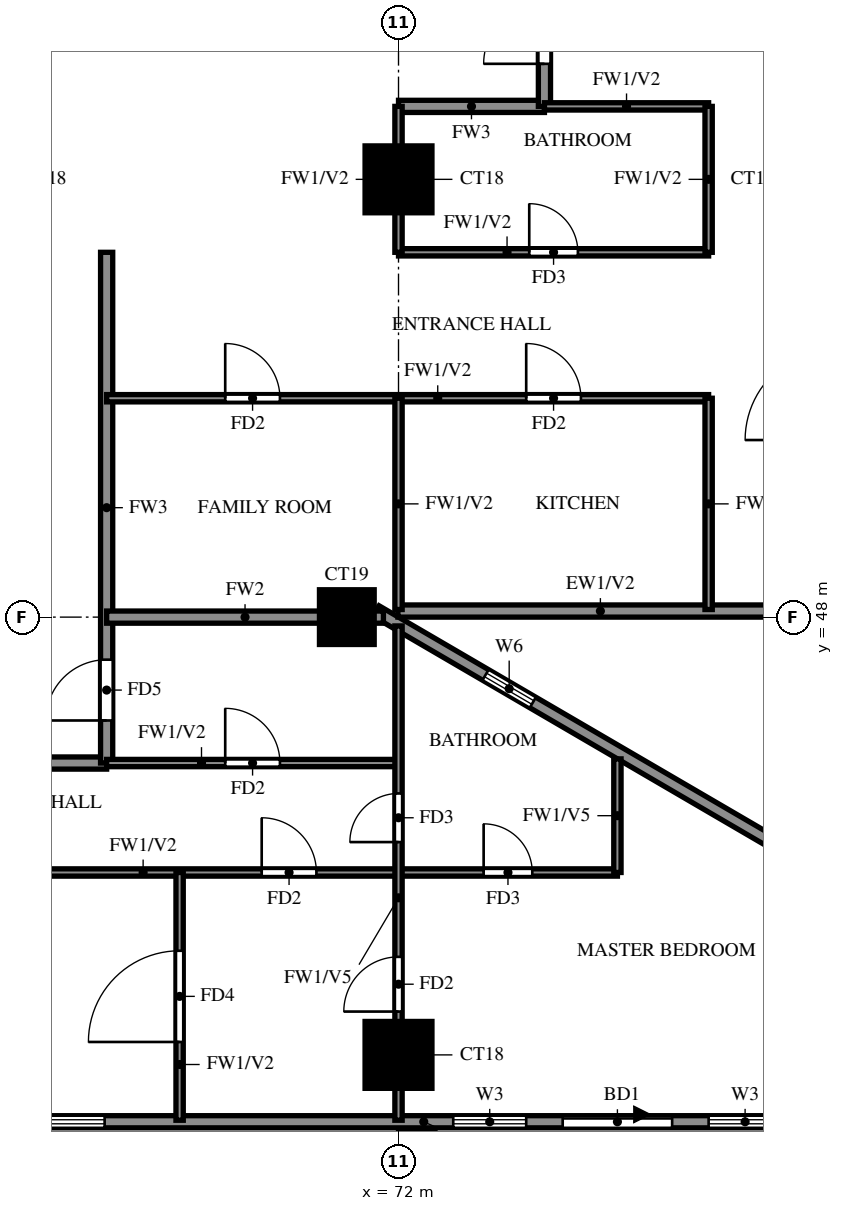
"""IFC4 building model, lengths in metres.
Left out: names, types, materials, properties, quantities, classifications, styles, units other than length and angle.
Written with IfcOpenShell. Run it as: python <this file> out.ifc"""

import sys

from ifc_helpers import new_model, si_unit, direction, frame, frame_2d, origin, origin_2d, place, context, subcontext, project, spatial, rectangle, extrude, source, transform, mapped, element, fill, save


model = new_model("IFC4")
c1 = context("Model", 3, precision=1e-05, world=origin(), true_north=direction((0.0, 1.0)))
c2 = subcontext(c1, "Body", "Model", "MODEL_VIEW")
j1 = project(units=[si_unit("LENGTHUNIT", "METRE"), si_unit("PLANEANGLEUNIT", "RADIAN")], contexts=[c1])
p1 = place(None, origin())
s1 = spatial("IfcSite", under=j1, at=p1, CompositionType="ELEMENT")
p2 = place(p1, origin())
s2 = spatial("IfcBuilding", under=s1, at=p2, CompositionType="ELEMENT")
p3 = place(p2, frame((0.0, 0.0, 127.0)))
s3 = spatial("IfcBuildingStorey", under=s2, at=p3, CompositionType="ELEMENT", Elevation=127.0)
m1 = source(origin(), c2, "Body", "SweptSolid", [
    extrude(rectangle(XDim=1.1, YDim=1.1, at=origin_2d()), origin(), (0.0, 0.0, 1.0), 3.2),
])
p4 = place(p3, frame((72.0, 40.8, 0.0), z_axis=(0.0, 0.0, 1.0), x_axis=(1.0, 0.0, 0.0)))
e1 = element("IfcColumn", 1, at=p4, inside=s3, PredefinedType="COLUMN", context=c2, shape_type="MappedRepresentation", body=[
    mapped(m1, transform((0.0, 0.0, 0.0))),
])
m2 = source(origin(), c2, "Body", "SweptSolid", [
    extrude(rectangle(XDim=0.9, YDim=0.9, at=origin_2d()), origin(), (0.0, 0.0, 1.0), 3.2),
])
p5 = place(p3, frame((71.15, 48.0, 0.0), z_axis=(0.0, 0.0, 1.0), x_axis=(1.0, 0.0, 0.0)))
e2 = element("IfcColumn", 2, at=p5, inside=s3, PredefinedType="COLUMN", context=c2, shape_type="MappedRepresentation", body=[
    mapped(m2, transform((0.0, 0.0, 0.0))),
])
p6 = place(p3, frame((72.0, 55.2, 0.0), z_axis=(0.0, 0.0, 1.0), x_axis=(1.0, 0.0, 0.0)))
e3 = element("IfcColumn", 3, at=p6, inside=s3, PredefinedType="COLUMN", context=c2, shape_type="MappedRepresentation", body=[
    mapped(m1, transform((0.0, 0.0, 0.0))),
])
p7 = place(p3, frame((85.719, 39.881, 0.0), z_axis=(0.0, 0.0, 1.0), x_axis=(-0.86377618652, 0.503875678716, 0.0)))
e4 = element("IfcWall", 4, at=p7, inside=s3, PredefinedType="SOLIDWALL", context=c2, shape_type="SweptSolid", body=[
    extrude(rectangle(XDim=16.311, YDim=0.2, at=frame_2d((8.156, 0.0))), origin(), (0.0, 0.0, 1.0), 3.2),
])
p8 = place(p7, frame((13.326, 0.0, 1.5)))
e5 = element("IfcOpeningElement", 5, at=p8, cuts=e4, PredefinedType="OPENING", context=c2, shape_type="SweptSolid", body=[
    extrude(rectangle(XDim=0.9, YDim=0.9, at=frame_2d((0.45, 0.45))), frame((0.0, 0.11, 0.0), z_axis=(0.0, -1.0, 0.0), x_axis=(1.0, 0.0, 0.0)), (0.0, 0.0, 1.0), 0.22),
])
p9 = place(p3, frame((71.99, 48.1, 0.0), z_axis=(0.0, 0.0, 1.0), x_axis=(1.0, 0.0, 0.0)))
e6 = element("IfcWall", 6, at=p9, inside=s3, PredefinedType="SOLIDWALL", context=c2, shape_type="SweptSolid", body=[
    extrude(rectangle(XDim=6.66, YDim=0.2, at=frame_2d((3.33, 0.0))), origin(), (0.0, 0.0, 1.0), 3.2),
])
p10 = place(p3, frame((58.8, 39.7, 0.0), z_axis=(0.0, 0.0, 1.0), x_axis=(1.0, 0.0, 0.0)))
e7 = element("IfcWall", 7, at=p10, inside=s3, PredefinedType="SOLIDWALL", context=c2, shape_type="SweptSolid", body=[
    extrude(rectangle(XDim=27.23, YDim=0.2, at=frame_2d((13.615, 0.0))), origin(), (0.0, 0.0, 1.0), 3.2),
])
p11 = place(p10, frame((15.9, 0.0, 0.0)))
e8 = element("IfcOpeningElement", 8, at=p11, cuts=e7, PredefinedType="OPENING", context=c2, shape_type="SweptSolid", body=[
    extrude(rectangle(XDim=1.8, YDim=2.4, at=frame_2d((0.9, 1.2))), frame((0.0, 0.11, 0.0), z_axis=(0.0, -1.0, 0.0), x_axis=(1.0, 0.0, 0.0)), (0.0, 0.0, 1.0), 0.22),
])
p12 = place(p10, frame((2.433, 0.0, 0.6)))
e9 = element("IfcOpeningElement", 9, at=p12, cuts=e7, PredefinedType="OPENING", context=c2, shape_type="SweptSolid", body=[
    extrude(rectangle(XDim=2.4, YDim=2.4, at=frame_2d((1.2, 1.2))), frame((0.0, 0.11, 0.0), z_axis=(0.0, -1.0, 0.0), x_axis=(1.0, 0.0, 0.0)), (0.0, 0.0, 1.0), 0.22),
])
p13 = place(p10, frame((5.967, 0.0, 0.6)))
e10 = element("IfcOpeningElement", 10, at=p13, cuts=e7, PredefinedType="OPENING", context=c2, shape_type="SweptSolid", body=[
    extrude(rectangle(XDim=2.4, YDim=2.4, at=frame_2d((1.2, 1.2))), frame((0.0, 0.11, 0.0), z_axis=(0.0, -1.0, 0.0), x_axis=(1.0, 0.0, 0.0)), (0.0, 0.0, 1.0), 0.22),
])
p14 = place(p10, frame((14.1, 0.0, 0.6)))
e11 = element("IfcOpeningElement", 11, at=p14, cuts=e7, PredefinedType="OPENING", context=c2, shape_type="SweptSolid", body=[
    extrude(rectangle(XDim=1.2, YDim=2.4, at=frame_2d((0.6, 1.2))), frame((0.0, 0.11, 0.0), z_axis=(0.0, -1.0, 0.0), x_axis=(1.0, 0.0, 0.0)), (0.0, 0.0, 1.0), 0.22),
])
p15 = place(p10, frame((18.3, 0.0, 0.6)))
e12 = element("IfcOpeningElement", 12, at=p15, cuts=e7, PredefinedType="OPENING", context=c2, shape_type="SweptSolid", body=[
    extrude(rectangle(XDim=1.2, YDim=2.4, at=frame_2d((0.6, 1.2))), frame((0.0, 0.11, 0.0), z_axis=(0.0, -1.0, 0.0), x_axis=(1.0, 0.0, 0.0)), (0.0, 0.0, 1.0), 0.22),
])
p16 = place(p10, frame((21.538, 0.0, 0.6)))
e13 = element("IfcOpeningElement", 13, at=p16, cuts=e7, PredefinedType="OPENING", context=c2, shape_type="SweptSolid", body=[
    extrude(rectangle(XDim=2.4, YDim=2.4, at=frame_2d((1.2, 1.2))), frame((0.0, 0.11, 0.0), z_axis=(0.0, -1.0, 0.0), x_axis=(1.0, 0.0, 0.0)), (0.0, 0.0, 1.0), 0.22),
])
p17 = place(p10, frame((26.003, 0.0, 0.6)))
e14 = element("IfcOpeningElement", 14, at=p17, cuts=e7, PredefinedType="OPENING", context=c2, shape_type="SweptSolid", body=[
    extrude(rectangle(XDim=0.9, YDim=2.4, at=frame_2d((0.45, 1.2))), frame((0.0, 0.11, 0.0), z_axis=(0.0, -1.0, 0.0), x_axis=(1.0, 0.0, 0.0)), (0.0, 0.0, 1.0), 0.22),
])
p18 = place(p3, frame((60.0, 45.6, 0.0), z_axis=(0.0, 0.0, 1.0), x_axis=(1.0, 0.0, 0.0)))
e15 = element("IfcWall", 15, at=p18, inside=s3, PredefinedType="SOLIDWALL", context=c2, shape_type="SweptSolid", body=[
    extrude(rectangle(XDim=7.2, YDim=0.2, at=frame_2d((3.6, 0.0))), origin(), (0.0, 0.0, 1.0), 3.2),
])
p19 = place(p3, frame((72.0, 56.4, 0.0), z_axis=(0.0, 0.0, 1.0), x_axis=(1.0, 0.0, 0.0)))
e16 = element("IfcWall", 16, at=p19, inside=s3, PredefinedType="SOLIDWALL", context=c2, shape_type="SweptSolid", body=[
    extrude(rectangle(XDim=2.4, YDim=0.2, at=frame_2d((1.2, 0.0))), origin(), (0.0, 0.0, 1.0), 3.2),
])
p20 = place(p3, frame((67.2, 45.6, 0.0), z_axis=(0.0, 0.0, 1.0), x_axis=(0.0, 1.0, 0.0)))
e17 = element("IfcWall", 17, at=p20, inside=s3, PredefinedType="SOLIDWALL", context=c2, shape_type="SweptSolid", body=[
    extrude(rectangle(XDim=8.4, YDim=0.2, at=frame_2d((4.2, 0.0))), origin(), (0.0, 0.0, 1.0), 3.2),
])
p21 = place(p20, frame((0.7, 0.0, 0.0)))
e18 = element("IfcOpeningElement", 18, at=p21, cuts=e17, PredefinedType="OPENING", context=c2, shape_type="SweptSolid", body=[
    extrude(rectangle(XDim=1.0, YDim=2.1, at=frame_2d((0.5, 1.05))), frame((0.0, 0.11, 0.0), z_axis=(0.0, -1.0, 0.0), x_axis=(1.0, 0.0, 0.0)), (0.0, 0.0, 1.0), 0.22),
])
p22 = place(p3, frame((74.4, 56.4, 0.0), z_axis=(0.0, 0.0, 1.0), x_axis=(0.0, 1.0, 0.0)))
e19 = element("IfcWall", 19, at=p22, inside=s3, PredefinedType="SOLIDWALL", context=c2, shape_type="SweptSolid", body=[
    extrude(rectangle(XDim=9.6, YDim=0.2, at=frame_2d((4.8, 0.0))), origin(), (0.0, 0.0, 1.0), 3.2),
])
p23 = place(p22, frame((0.7, 0.0, 0.0)))
e20 = element("IfcOpeningElement", 20, at=p23, cuts=e19, PredefinedType="OPENING", context=c2, shape_type="SweptSolid", body=[
    extrude(rectangle(XDim=1.0, YDim=2.1, at=frame_2d((0.5, 1.05))), frame((0.0, 0.11, 0.0), z_axis=(0.0, -1.0, 0.0), x_axis=(1.0, 0.0, 0.0)), (0.0, 0.0, 1.0), 0.22),
])
p24 = place(p22, frame((3.1, 0.0, 0.0)))
e21 = element("IfcOpeningElement", 21, at=p24, cuts=e19, PredefinedType="OPENING", context=c2, shape_type="SweptSolid", body=[
    extrude(rectangle(XDim=1.0, YDim=2.1, at=frame_2d((0.5, 1.05))), frame((0.0, 0.11, 0.0), z_axis=(0.0, -1.0, 0.0), x_axis=(1.0, 0.0, 0.0)), (0.0, 0.0, 1.0), 0.22),
])
p25 = place(p3, frame((67.2, 48.0, 0.0), z_axis=(0.0, 0.0, 1.0), x_axis=(1.0, 0.0, 0.0)))
e22 = element("IfcWall", 22, at=p25, inside=s3, PredefinedType="SOLIDWALL", context=c2, shape_type="SweptSolid", body=[
    extrude(rectangle(XDim=4.552, YDim=0.2, at=frame_2d((2.276, 0.0))), origin(), (0.0, 0.0, 1.0), 3.2),
])
p26 = place(p3, frame((60.0, 43.8, 0.0), z_axis=(0.0, 0.0, 1.0), x_axis=(1.0, 0.0, 0.0)))
e23 = element("IfcWall", 23, at=p26, inside=s3, PredefinedType="PARTITIONING", context=c2, shape_type="SweptSolid", body=[
    extrude(rectangle(XDim=15.6, YDim=0.12, at=frame_2d((7.8, 0.0))), origin(), (0.0, 0.0, 1.0), 3.2),
])
p27 = place(p26, frame((9.75, 0.0, 0.0)))
e24 = element("IfcOpeningElement", 24, at=p27, cuts=e23, PredefinedType="OPENING", context=c2, shape_type="SweptSolid", body=[
    extrude(rectangle(XDim=0.9, YDim=2.1, at=frame_2d((0.45, 1.05))), frame((0.0, 0.07, 0.0), z_axis=(0.0, -1.0, 0.0), x_axis=(1.0, 0.0, 0.0)), (0.0, 0.0, 1.0), 0.14),
])
p28 = place(p26, frame((3.45, 0.0, 0.0)))
e25 = element("IfcOpeningElement", 25, at=p28, cuts=e23, PredefinedType="OPENING", context=c2, shape_type="SweptSolid", body=[
    extrude(rectangle(XDim=1.5, YDim=2.1, at=frame_2d((0.75, 1.05))), frame((0.0, 0.07, 0.0), z_axis=(0.0, -1.0, 0.0), x_axis=(1.0, 0.0, 0.0)), (0.0, 0.0, 1.0), 0.14),
])
p29 = place(p26, frame((13.4, 0.0, 0.0)))
e26 = element("IfcOpeningElement", 26, at=p29, cuts=e23, PredefinedType="OPENING", context=c2, shape_type="SweptSolid", body=[
    extrude(rectangle(XDim=0.8, YDim=2.1, at=frame_2d((0.4, 1.05))), frame((0.0, 0.07, 0.0), z_axis=(0.0, -1.0, 0.0), x_axis=(1.0, 0.0, 0.0)), (0.0, 0.0, 1.0), 0.14),
])
p30 = place(p3, frame((67.2, 45.6, 0.0), z_axis=(0.0, 0.0, 1.0), x_axis=(1.0, 0.0, 0.0)))
e27 = element("IfcWall", 27, at=p30, inside=s3, PredefinedType="PARTITIONING", context=c2, shape_type="SweptSolid", body=[
    extrude(rectangle(XDim=4.8, YDim=0.12, at=frame_2d((2.4, 0.0))), origin(), (0.0, 0.0, 1.0), 3.2),
])
p31 = place(p30, frame((1.95, 0.0, 0.0)))
e28 = element("IfcOpeningElement", 28, at=p31, cuts=e27, PredefinedType="OPENING", context=c2, shape_type="SweptSolid", body=[
    extrude(rectangle(XDim=0.9, YDim=2.1, at=frame_2d((0.45, 1.05))), frame((0.0, 0.07, 0.0), z_axis=(0.0, -1.0, 0.0), x_axis=(1.0, 0.0, 0.0)), (0.0, 0.0, 1.0), 0.14),
])
p32 = place(p3, frame((67.2, 51.6, 0.0), z_axis=(0.0, 0.0, 1.0), x_axis=(1.0, 0.0, 0.0)))
e29 = element("IfcWall", 29, at=p32, inside=s3, PredefinedType="PARTITIONING", context=c2, shape_type="SweptSolid", body=[
    extrude(rectangle(XDim=9.9, YDim=0.12, at=frame_2d((4.95, 0.0))), origin(), (0.0, 0.0, 1.0), 3.2),
])
p33 = place(p32, frame((6.9, 0.0, 0.0)))
e30 = element("IfcOpeningElement", 30, at=p33, cuts=e29, PredefinedType="OPENING", context=c2, shape_type="SweptSolid", body=[
    extrude(rectangle(XDim=0.9, YDim=2.1, at=frame_2d((0.45, 1.05))), frame((0.0, 0.07, 0.0), z_axis=(0.0, -1.0, 0.0), x_axis=(1.0, 0.0, 0.0)), (0.0, 0.0, 1.0), 0.14),
])
p34 = place(p32, frame((1.95, 0.0, 0.0)))
e31 = element("IfcOpeningElement", 31, at=p34, cuts=e29, PredefinedType="OPENING", context=c2, shape_type="SweptSolid", body=[
    extrude(rectangle(XDim=0.9, YDim=2.1, at=frame_2d((0.45, 1.05))), frame((0.0, 0.07, 0.0), z_axis=(0.0, -1.0, 0.0), x_axis=(1.0, 0.0, 0.0)), (0.0, 0.0, 1.0), 0.14),
])
p35 = place(p3, frame((72.0, 54.0, 0.0), z_axis=(0.0, 0.0, 1.0), x_axis=(1.0, 0.0, 0.0)))
e32 = element("IfcWall", 32, at=p35, inside=s3, PredefinedType="PARTITIONING", context=c2, shape_type="SweptSolid", body=[
    extrude(rectangle(XDim=5.1, YDim=0.12, at=frame_2d((2.55, 0.0))), origin(), (0.0, 0.0, 1.0), 3.2),
])
p36 = place(p35, frame((2.15, 0.0, 0.0)))
e33 = element("IfcOpeningElement", 33, at=p36, cuts=e32, PredefinedType="OPENING", context=c2, shape_type="SweptSolid", body=[
    extrude(rectangle(XDim=0.8, YDim=2.1, at=frame_2d((0.4, 1.05))), frame((0.0, 0.07, 0.0), z_axis=(0.0, -1.0, 0.0), x_axis=(1.0, 0.0, 0.0)), (0.0, 0.0, 1.0), 0.14),
])
p37 = place(p3, frame((74.4, 56.4, 0.0), z_axis=(0.0, 0.0, 1.0), x_axis=(1.0, 0.0, 0.0)))
e34 = element("IfcWall", 34, at=p37, inside=s3, PredefinedType="PARTITIONING", context=c2, shape_type="SweptSolid", body=[
    extrude(rectangle(XDim=2.7, YDim=0.12, at=frame_2d((1.35, 0.0))), origin(), (0.0, 0.0, 1.0), 3.2),
])
p38 = place(p3, frame((68.4, 39.725, 0.0), z_axis=(0.0, 0.0, 1.0), x_axis=(0.0, 1.0, 0.0)))
e35 = element("IfcWall", 35, at=p38, inside=s3, PredefinedType="PARTITIONING", context=c2, shape_type="SweptSolid", body=[
    extrude(rectangle(XDim=4.075, YDim=0.12, at=frame_2d((2.038, 0.0))), origin(), (0.0, 0.0, 1.0), 3.2),
])
p39 = place(p38, frame((1.288, 0.0, 0.0)))
e36 = element("IfcOpeningElement", 36, at=p39, cuts=e35, PredefinedType="OPENING", context=c2, shape_type="SweptSolid", body=[
    extrude(rectangle(XDim=1.5, YDim=2.1, at=frame_2d((0.75, 1.05))), frame((0.0, 0.07, 0.0), z_axis=(0.0, -1.0, 0.0), x_axis=(1.0, 0.0, 0.0)), (0.0, 0.0, 1.0), 0.14),
])
p40 = place(p3, frame((72.0, 39.725, 0.0), z_axis=(0.0, 0.0, 1.0), x_axis=(0.0, 1.0, 0.0)))
e37 = element("IfcWall", 37, at=p40, inside=s3, PredefinedType="PARTITIONING", context=c2, shape_type="SweptSolid", body=[
    extrude(rectangle(XDim=8.13, YDim=0.12, at=frame_2d((4.065, 0.0))), origin(), (0.0, 0.0, 1.0), 2.3),
])
p41 = place(p40, frame((1.788, 0.0, 0.0)))
e38 = element("IfcOpeningElement", 38, at=p41, cuts=e37, PredefinedType="OPENING", context=c2, shape_type="SweptSolid", body=[
    extrude(rectangle(XDim=0.9, YDim=2.1, at=frame_2d((0.45, 1.05))), frame((0.0, 0.07, 0.0), z_axis=(0.0, -1.0, 0.0), x_axis=(1.0, 0.0, 0.0)), (0.0, 0.0, 1.0), 0.14),
])
p42 = place(p40, frame((4.575, 0.0, 0.0)))
e39 = element("IfcOpeningElement", 39, at=p42, cuts=e37, PredefinedType="OPENING", context=c2, shape_type="SweptSolid", body=[
    extrude(rectangle(XDim=0.8, YDim=2.1, at=frame_2d((0.4, 1.05))), frame((0.0, 0.07, 0.0), z_axis=(0.0, -1.0, 0.0), x_axis=(1.0, 0.0, 0.0)), (0.0, 0.0, 1.0), 0.14),
])
p43 = place(p3, frame((72.0, 48.125, 0.0), z_axis=(0.0, 0.0, 1.0), x_axis=(0.0, 1.0, 0.0)))
e40 = element("IfcWall", 40, at=p43, inside=s3, PredefinedType="PARTITIONING", context=c2, shape_type="SweptSolid", body=[
    extrude(rectangle(XDim=3.475, YDim=0.12, at=frame_2d((1.738, 0.0))), origin(), (0.0, 0.0, 1.0), 3.2),
])
p44 = place(p3, frame((72.0, 54.0, 0.0), z_axis=(0.0, 0.0, 1.0), x_axis=(0.0, 1.0, 0.0)))
e41 = element("IfcWall", 41, at=p44, inside=s3, PredefinedType="PARTITIONING", context=c2, shape_type="SweptSolid", body=[
    extrude(rectangle(XDim=2.4, YDim=0.12, at=frame_2d((1.2, 0.0))), origin(), (0.0, 0.0, 1.0), 3.2),
])
p45 = place(p3, frame((75.6, 43.8, 0.0), z_axis=(0.0, 0.0, 1.0), x_axis=(0.0, 1.0, 0.0)))
e42 = element("IfcWall", 42, at=p45, inside=s3, PredefinedType="PARTITIONING", context=c2, shape_type="SweptSolid", body=[
    extrude(rectangle(XDim=1.868, YDim=0.12, at=frame_2d((0.934, 0.0))), origin(), (0.0, 0.0, 1.0), 2.3),
])
p46 = place(p3, frame((77.1, 48.125, 0.0), z_axis=(0.0, 0.0, 1.0), x_axis=(0.0, 1.0, 0.0)))
e43 = element("IfcWall", 43, at=p46, inside=s3, PredefinedType="PARTITIONING", context=c2, shape_type="SweptSolid", body=[
    extrude(rectangle(XDim=3.475, YDim=0.12, at=frame_2d((1.738, 0.0))), origin(), (0.0, 0.0, 1.0), 3.2),
])
p47 = place(p3, frame((77.1, 54.0, 0.0), z_axis=(0.0, 0.0, 1.0), x_axis=(0.0, 1.0, 0.0)))
e44 = element("IfcWall", 44, at=p47, inside=s3, PredefinedType="PARTITIONING", context=c2, shape_type="SweptSolid", body=[
    extrude(rectangle(XDim=2.4, YDim=0.12, at=frame_2d((1.2, 0.0))), origin(), (0.0, 0.0, 1.0), 3.2),
])
p48 = place(p8, origin())
e45 = element("IfcWindow", 45, at=p48, inside=s3, PartitioningType="SINGLE_PANEL", PredefinedType="WINDOW", context=c2, shape_type="SweptSolid", body=[
    extrude(rectangle(XDim=0.9, YDim=0.9, at=frame_2d((0.45, 0.45))), frame((0.0, 0.03, 0.0), z_axis=(0.0, -1.0, 0.0), x_axis=(1.0, 0.0, 0.0)), (0.0, 0.0, 1.0), 0.06),
])
fill(e5, e45)
p49 = place(p11, origin())
e46 = element("IfcDoor", 46, at=p49, inside=s3, OperationType="DOUBLE_DOOR_SLIDING", PredefinedType="DOOR", context=c2, shape_type="SweptSolid", body=[
    extrude(rectangle(XDim=1.8, YDim=2.4, at=frame_2d((0.9, 1.2))), frame((0.0, 0.025, 0.0), z_axis=(0.0, -1.0, 0.0), x_axis=(1.0, 0.0, 0.0)), (0.0, 0.0, 1.0), 0.05),
])
fill(e8, e46)
p50 = place(p13, origin())
e47 = element("IfcWindow", 47, at=p50, inside=s3, PartitioningType="DOUBLE_PANEL_VERTICAL", PredefinedType="WINDOW", context=c2, shape_type="SweptSolid", body=[
    extrude(rectangle(XDim=2.4, YDim=2.4, at=frame_2d((1.2, 1.2))), frame((0.0, 0.03, 0.0), z_axis=(0.0, -1.0, 0.0), x_axis=(1.0, 0.0, 0.0)), (0.0, 0.0, 1.0), 0.06),
])
fill(e10, e47)
p51 = place(p14, origin())
e48 = element("IfcWindow", 48, at=p51, inside=s3, PartitioningType="SINGLE_PANEL", PredefinedType="WINDOW", context=c2, shape_type="SweptSolid", body=[
    extrude(rectangle(XDim=1.2, YDim=2.4, at=frame_2d((0.6, 1.2))), frame((0.0, 0.03, 0.0), z_axis=(0.0, -1.0, 0.0), x_axis=(1.0, 0.0, 0.0)), (0.0, 0.0, 1.0), 0.06),
])
fill(e11, e48)
p52 = place(p15, origin())
e49 = element("IfcWindow", 49, at=p52, inside=s3, PartitioningType="SINGLE_PANEL", PredefinedType="WINDOW", context=c2, shape_type="SweptSolid", body=[
    extrude(rectangle(XDim=1.2, YDim=2.4, at=frame_2d((0.6, 1.2))), frame((0.0, 0.03, 0.0), z_axis=(0.0, -1.0, 0.0), x_axis=(1.0, 0.0, 0.0)), (0.0, 0.0, 1.0), 0.06),
])
fill(e12, e49)
p53 = place(p23, origin())
e50 = element("IfcDoor", 50, at=p53, inside=s3, OperationType="SINGLE_SWING_RIGHT", PredefinedType="DOOR", context=c2, shape_type="SweptSolid", body=[
    extrude(rectangle(XDim=1.0, YDim=2.1, at=frame_2d((0.5, 1.05))), frame((0.0, 0.025, 0.0), z_axis=(0.0, -1.0, 0.0), x_axis=(1.0, 0.0, 0.0)), (0.0, 0.0, 1.0), 0.05),
])
fill(e20, e50)
p54 = place(p33, origin())
e51 = element("IfcDoor", 51, at=p54, inside=s3, OperationType="SINGLE_SWING_RIGHT", PredefinedType="DOOR", context=c2, shape_type="SweptSolid", body=[
    extrude(rectangle(XDim=0.9, YDim=2.1, at=frame_2d((0.45, 1.05))), frame((0.0, 0.025, 0.0), z_axis=(0.0, -1.0, 0.0), x_axis=(1.0, 0.0, 0.0)), (0.0, 0.0, 1.0), 0.05),
])
fill(e30, e51)
p55 = place(p36, origin())
e52 = element("IfcDoor", 52, at=p55, inside=s3, OperationType="SINGLE_SWING_LEFT", PredefinedType="DOOR", context=c2, shape_type="SweptSolid", body=[
    extrude(rectangle(XDim=0.8, YDim=2.1, at=frame_2d((0.4, 1.05))), frame((0.0, 0.025, 0.0), z_axis=(0.0, -1.0, 0.0), x_axis=(1.0, 0.0, 0.0)), (0.0, 0.0, 1.0), 0.05),
])
fill(e33, e52)
p56 = place(p34, origin())
e53 = element("IfcDoor", 53, at=p56, inside=s3, OperationType="SINGLE_SWING_LEFT", PredefinedType="DOOR", context=c2, shape_type="SweptSolid", body=[
    extrude(rectangle(XDim=0.9, YDim=2.1, at=frame_2d((0.45, 1.05))), frame((0.0, 0.025, 0.0), z_axis=(0.0, -1.0, 0.0), x_axis=(1.0, 0.0, 0.0)), (0.0, 0.0, 1.0), 0.05),
])
fill(e31, e53)
p57 = place(p39, origin())
e54 = element("IfcDoor", 54, at=p57, inside=s3, OperationType="SINGLE_SWING_LEFT", PredefinedType="DOOR", context=c2, shape_type="SweptSolid", body=[
    extrude(rectangle(XDim=1.5, YDim=2.1, at=frame_2d((0.75, 1.05))), frame((0.0, 0.025, 0.0), z_axis=(0.0, -1.0, 0.0), x_axis=(1.0, 0.0, 0.0)), (0.0, 0.0, 1.0), 0.05),
])
fill(e36, e54)
p58 = place(p31, origin())
e55 = element("IfcDoor", 55, at=p58, inside=s3, OperationType="SINGLE_SWING_LEFT", PredefinedType="DOOR", context=c2, shape_type="SweptSolid", body=[
    extrude(rectangle(XDim=0.9, YDim=2.1, at=frame_2d((0.45, 1.05))), frame((0.0, 0.025, 0.0), z_axis=(0.0, -1.0, 0.0), x_axis=(1.0, 0.0, 0.0)), (0.0, 0.0, 1.0), 0.05),
])
fill(e28, e55)
p59 = place(p21, origin())
e56 = element("IfcDoor", 56, at=p59, inside=s3, OperationType="SINGLE_SWING_RIGHT", PredefinedType="DOOR", context=c2, shape_type="SweptSolid", body=[
    extrude(rectangle(XDim=1.0, YDim=2.1, at=frame_2d((0.5, 1.05))), frame((0.0, 0.025, 0.0), z_axis=(0.0, -1.0, 0.0), x_axis=(1.0, 0.0, 0.0)), (0.0, 0.0, 1.0), 0.05),
])
fill(e18, e56)
p60 = place(p27, origin())
e57 = element("IfcDoor", 57, at=p60, inside=s3, OperationType="SINGLE_SWING_LEFT", PredefinedType="DOOR", context=c2, shape_type="SweptSolid", body=[
    extrude(rectangle(XDim=0.9, YDim=2.1, at=frame_2d((0.45, 1.05))), frame((0.0, 0.025, 0.0), z_axis=(0.0, -1.0, 0.0), x_axis=(1.0, 0.0, 0.0)), (0.0, 0.0, 1.0), 0.05),
])
fill(e24, e57)
p61 = place(p41, origin())
e58 = element("IfcDoor", 58, at=p61, inside=s3, OperationType="SINGLE_SWING_LEFT", PredefinedType="DOOR", context=c2, shape_type="SweptSolid", body=[
    extrude(rectangle(XDim=0.9, YDim=2.1, at=frame_2d((0.45, 1.05))), frame((0.0, 0.025, 0.0), z_axis=(0.0, -1.0, 0.0), x_axis=(1.0, 0.0, 0.0)), (0.0, 0.0, 1.0), 0.05),
])
fill(e38, e58)
p62 = place(p42, origin())
e59 = element("IfcDoor", 59, at=p62, inside=s3, OperationType="SINGLE_SWING_LEFT", PredefinedType="DOOR", context=c2, shape_type="SweptSolid", body=[
    extrude(rectangle(XDim=0.8, YDim=2.1, at=frame_2d((0.4, 1.05))), frame((0.0, 0.025, 0.0), z_axis=(0.0, -1.0, 0.0), x_axis=(1.0, 0.0, 0.0)), (0.0, 0.0, 1.0), 0.05),
])
fill(e39, e59)
p63 = place(p29, origin())
e60 = element("IfcDoor", 60, at=p63, inside=s3, OperationType="SINGLE_SWING_LEFT", PredefinedType="DOOR", context=c2, shape_type="SweptSolid", body=[
    extrude(rectangle(XDim=0.8, YDim=2.1, at=frame_2d((0.4, 1.05))), frame((0.0, 0.025, 0.0), z_axis=(0.0, -1.0, 0.0), x_axis=(1.0, 0.0, 0.0)), (0.0, 0.0, 1.0), 0.05),
])
fill(e26, e60)
save(model, sys.argv[1])
